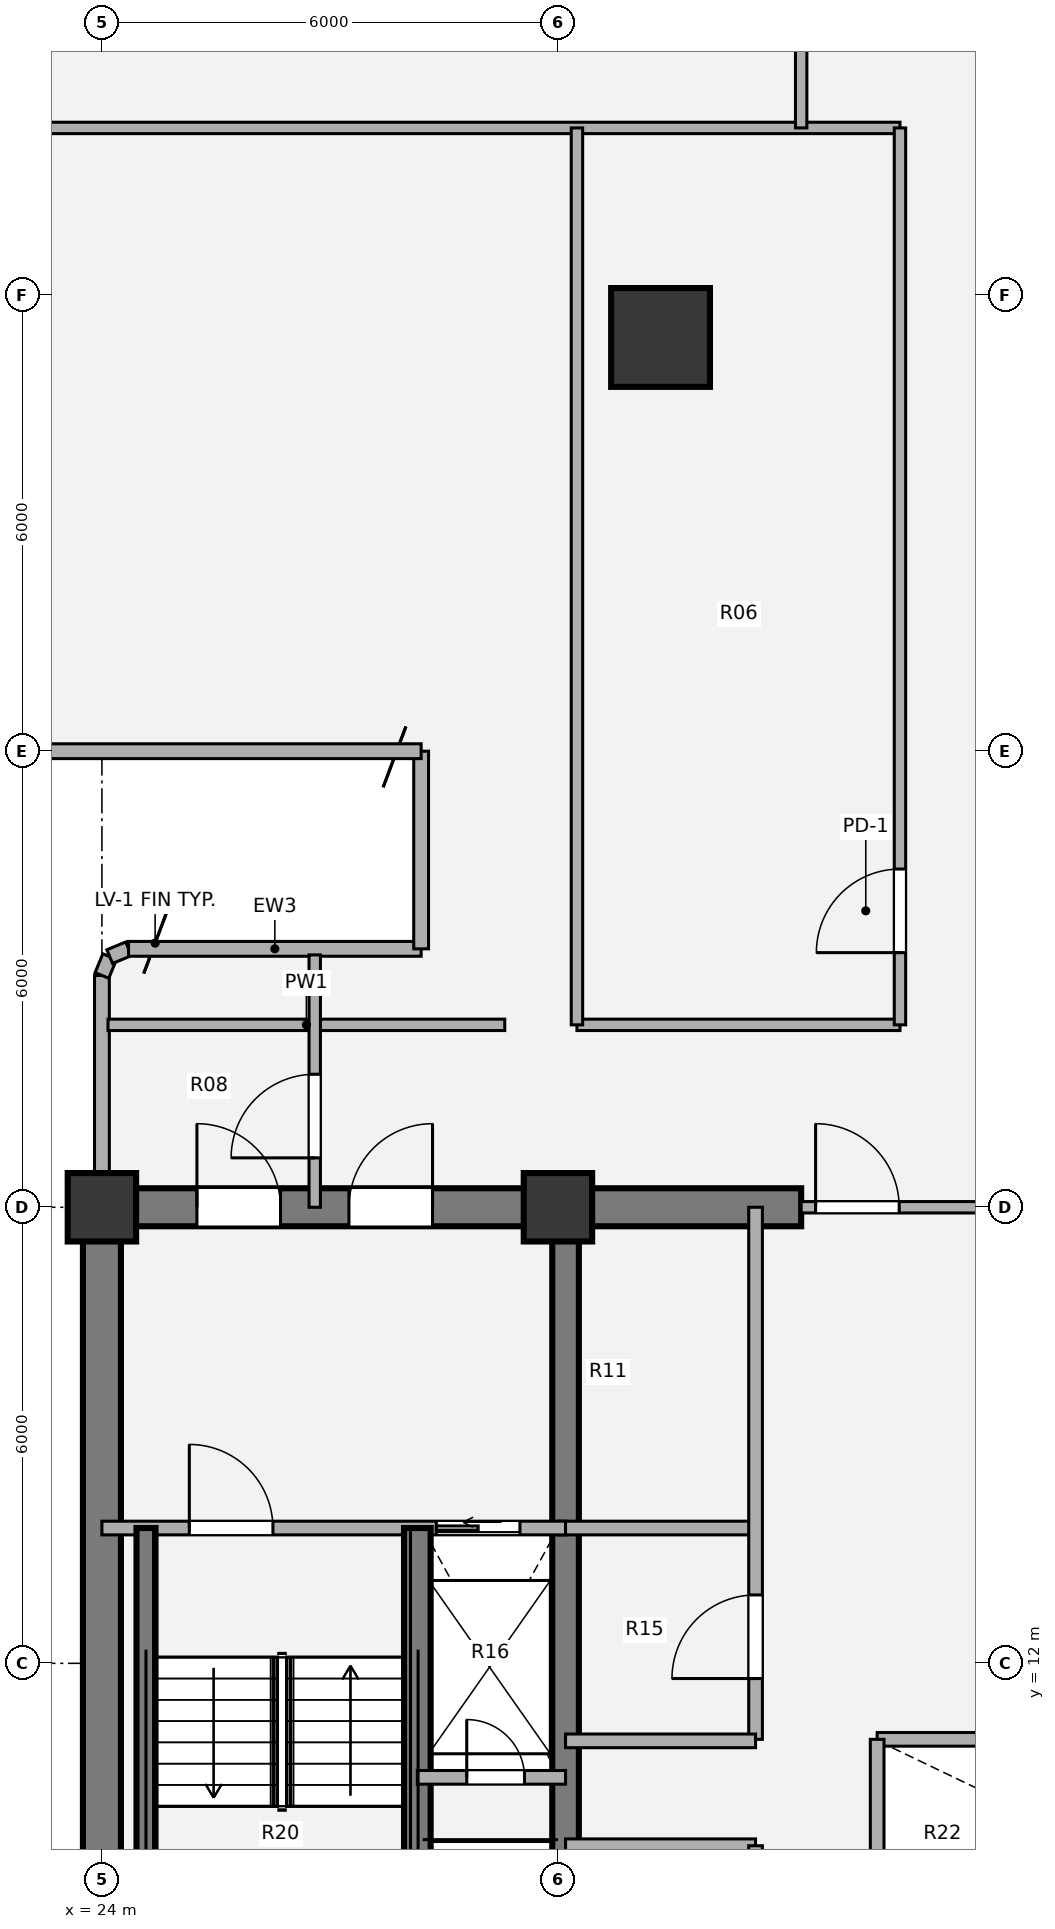
"""IFC4 building model, lengths in metres.
Left out: names, types, materials, properties, quantities, classifications, styles, units other than length and angle.
Written with IfcOpenShell. Run it as: python <this file> out.ifc"""

import sys

from ifc_helpers import new_model, si_unit, direction, frame, frame_2d, origin, origin_2d, place, context, subcontext, project, spatial, rectangle, hollow_circle, extrude, source, transform, mapped, element, fill, save


model = new_model("IFC4")
c1 = context("Model", 3, precision=1e-05, world=origin(), true_north=direction((0.0, 1.0)))
c2 = subcontext(c1, "Body", "Model", "MODEL_VIEW")
j1 = project(units=[si_unit("LENGTHUNIT", "METRE"), si_unit("PLANEANGLEUNIT", "RADIAN")], contexts=[c1])
p1 = place(None, origin())
s1 = spatial("IfcSite", under=j1, at=p1, CompositionType="ELEMENT")
p2 = place(p1, origin())
s2 = spatial("IfcBuilding", under=s1, at=p2, CompositionType="ELEMENT")
p3 = place(p2, frame((0.0, 0.0, 146.52)))
s3 = spatial("IfcBuildingStorey", under=s2, at=p3, CompositionType="ELEMENT", Elevation=146.52)
m1 = source(origin(), c2, "Body", "SweptSolid", [
    extrude(rectangle(XDim=0.9, YDim=0.9, at=origin_2d()), origin(), (0.0, 0.0, 1.0), 5.4),
])
for number, where, z_axis, x_axis in (
    (1, (24.0, 18.0, 0.0), (0.0, 0.0, 1.0), (1.0, 0.0, 0.0)),
    (2, (30.0, 18.0, 0.0), (0.0, 0.0, 1.0), (1.0, 0.0, 0.0)),
):
    element("IfcColumn", number, at=place(p3, frame(where, z_axis=z_axis, x_axis=x_axis)), inside=s3, PredefinedType="COLUMN", context=c2, shape_type="MappedRepresentation", body=[
        mapped(m1, transform((0.0, 0.0, 0.0), x_axis=(1.0, 0.0, 0.0), y_axis=(0.0, 1.0, 0.0), z_axis=(0.0, 0.0, 1.0), scale=1.0)),
    ])
p4 = place(p3, frame((24.0, 6.0, 0.0), z_axis=(0.0, 0.0, 1.0), x_axis=(0.0, 1.0, 0.0)))
e3 = element("IfcWall", 3, at=p4, inside=s3, PredefinedType="SHEAR", context=c2, shape_type="SweptSolid", body=[
    extrude(rectangle(XDim=12.0, YDim=0.5, at=frame_2d((6.0, 0.0))), origin(), (0.0, 0.0, 1.0), 5.4),
])
p5 = place(p3, frame((23.75, 18.0, 0.0), z_axis=(0.0, 0.0, 1.0), x_axis=(1.0, 0.0, 0.0)))
e4 = element("IfcWall", 4, at=p5, inside=s3, PredefinedType="SHEAR", context=c2, shape_type="SweptSolid", body=[
    extrude(rectangle(XDim=9.45, YDim=0.5, at=frame_2d((4.725, 0.0))), origin(), (0.0, 0.0, 1.0), 5.4),
])
p6 = place(p5, frame((1.5, 0.0, 0.0)))
e5 = element("IfcOpeningElement", 5, at=p6, cuts=e4, PredefinedType="OPENING", context=c2, shape_type="SweptSolid", body=[
    extrude(rectangle(XDim=1.1, YDim=2.1, at=origin_2d()), frame((0.55, 0.26, 1.05), z_axis=(0.0, -1.0, 0.0), x_axis=(1.0, 0.0, 0.0)), (0.0, 0.0, 1.0), 0.52),
])
p7 = place(p5, frame((3.5, 0.0, 0.0)))
e6 = element("IfcOpeningElement", 6, at=p7, cuts=e4, PredefinedType="OPENING", context=c2, shape_type="SweptSolid", body=[
    extrude(rectangle(XDim=1.1, YDim=2.1, at=origin_2d()), frame((0.55, 0.26, 1.05), z_axis=(0.0, -1.0, 0.0), x_axis=(1.0, 0.0, 0.0)), (0.0, 0.0, 1.0), 0.52),
])
p8 = place(p3, frame((30.1, 6.0, 0.0), z_axis=(0.0, 0.0, 1.0), x_axis=(0.0, 1.0, 0.0)))
e7 = element("IfcWall", 7, at=p8, inside=s3, PredefinedType="SHEAR", context=c2, shape_type="SweptSolid", body=[
    extrude(rectangle(XDim=12.0, YDim=0.35, at=frame_2d((6.0, 0.0))), origin(), (0.0, 0.0, 1.0), 5.4),
])
m2 = source(origin(), c2, "Body", "SweptSolid", [
    extrude(hollow_circle(Radius=0.65, WallThickness=0.045, at=origin_2d()), origin(), (0.0, 0.0, 1.0), 6.338),
])
p9 = place(p3, frame((31.35, 27.482, 0.421), z_axis=(0.0, 0.618885910055, 0.785480891133), x_axis=(-1.0, 0.0, 0.0)))
e8 = element("IfcColumn", 8, at=p9, inside=s3, PredefinedType="COLUMN", context=c2, shape_type="MappedRepresentation", body=[
    mapped(m2, transform((0.0, 0.0, 0.0), x_axis=(1.0, 0.0, 0.0), y_axis=(0.0, 1.0, 0.0), z_axis=(0.0, 0.0, 1.0), scale=1.0)),
])
p10 = place(p3, frame((24.0, 18.43, 0.0), z_axis=(0.0, 0.0, 1.0), x_axis=(0.0, 1.0, 0.0)))
e9 = element("IfcWall", 9, at=p10, inside=s3, PredefinedType="SOLIDWALL", context=c2, shape_type="SweptSolid", body=[
    extrude(rectangle(XDim=2.62, YDim=0.195, at=frame_2d((1.31, 0.0))), origin(), (0.0, 0.0, 1.0), 5.08),
])
p11 = place(p3, frame((24.0, 21.05, 0.0), z_axis=(0.0, 0.0, 1.0), x_axis=(0.382673670509, 0.923883575944, 0.0)))
e10 = element("IfcWall", 10, at=p11, inside=s3, PredefinedType="SOLIDWALL", context=c2, shape_type="SweptSolid", body=[
    extrude(rectangle(XDim=0.268, YDim=0.195, at=frame_2d((0.134, 0.0))), origin(), (0.0, 0.0, 1.0), 5.08),
])
p12 = place(p3, frame((24.103, 21.298, 0.0), z_axis=(0.0, 0.0, 1.0), x_axis=(0.924205486139, 0.381895560841, 0.0)))
e11 = element("IfcWall", 11, at=p12, inside=s3, PredefinedType="SOLIDWALL", context=c2, shape_type="SweptSolid", body=[
    extrude(rectangle(XDim=0.268, YDim=0.195, at=frame_2d((0.134, 0.0))), origin(), (0.0, 0.0, 1.0), 5.08),
])
p13 = place(p3, frame((24.35, 21.4, 0.0), z_axis=(0.0, 0.0, 1.0), x_axis=(1.0, 0.0, 0.0)))
e12 = element("IfcWall", 12, at=p13, inside=s3, PredefinedType="SOLIDWALL", context=c2, shape_type="SweptSolid", body=[
    extrude(rectangle(XDim=3.85, YDim=0.195, at=frame_2d((1.925, 0.0))), origin(), (0.0, 0.0, 1.0), 5.08),
])
p14 = place(p3, frame((28.2, 21.4, 0.0), z_axis=(0.0, 0.0, 1.0), x_axis=(0.0, 1.0, 0.0)))
e13 = element("IfcWall", 13, at=p14, inside=s3, PredefinedType="SOLIDWALL", context=c2, shape_type="SweptSolid", body=[
    extrude(rectangle(XDim=2.6, YDim=0.195, at=frame_2d((1.3, 0.0))), origin(), (0.0, 0.0, 1.0), 5.08),
])
p15 = place(p3, frame((28.2, 24.0, 0.0), z_axis=(0.0, 0.0, 1.0), x_axis=(-1.0, 0.0, 0.0)))
e14 = element("IfcWall", 14, at=p15, inside=s3, PredefinedType="SOLIDWALL", context=c2, shape_type="SweptSolid", body=[
    extrude(rectangle(XDim=11.1, YDim=0.195, at=frame_2d((5.55, 0.0))), origin(), (0.0, 0.0, 1.0), 5.08),
])
p16 = place(p3, frame((30.0, 13.78, 0.0), z_axis=(0.0, 0.0, 1.0), x_axis=(1.0, 0.0, 0.0)))
e15 = element("IfcWall", 15, at=p16, inside=s3, PredefinedType="PARTITIONING", context=c2, shape_type="SweptSolid", body=[
    extrude(rectangle(XDim=2.6, YDim=0.18, at=frame_2d((1.3, 0.0))), origin(), (0.0, 0.0, 1.0), 5.05),
])
p17 = place(p3, frame((32.6, 11.0, 0.0), z_axis=(0.0, 0.0, 1.0), x_axis=(0.0, 1.0, 0.0)))
e16 = element("IfcWall", 16, at=p17, inside=s3, PredefinedType="PARTITIONING", context=c2, shape_type="SweptSolid", body=[
    extrude(rectangle(XDim=7.0, YDim=0.18, at=frame_2d((3.5, 0.0))), origin(), (0.0, 0.0, 1.0), 5.05),
])
p18 = place(p17, frame((0.8, 0.0, 0.0)))
e17 = element("IfcOpeningElement", 17, at=p18, cuts=e16, PredefinedType="OPENING", context=c2, shape_type="SweptSolid", body=[
    extrude(rectangle(XDim=1.1, YDim=2.1, at=origin_2d()), frame((0.55, 0.1, 1.05), z_axis=(0.0, -1.0, 0.0), x_axis=(1.0, 0.0, 0.0)), (0.0, 0.0, 1.0), 0.2),
])
p19 = place(p3, frame((34.2, 11.0, 0.0), z_axis=(0.0, 0.0, 1.0), x_axis=(1.0, 0.0, 0.0)))
e18 = element("IfcWall", 18, at=p19, inside=s3, PredefinedType="PARTITIONING", context=c2, shape_type="SweptSolid", body=[
    extrude(rectangle(XDim=5.15, YDim=0.18, at=frame_2d((2.575, 0.0))), origin(), (0.0, 0.0, 1.0), 5.05),
])
for number, where, z_axis, x_axis in (
    (19, (34.2, 8.5, 0.0), (0.0, 0.0, 1.0), (0.0, 1.0, 0.0)),
    (20, (30.1, 10.98, 0.0), (0.0, 0.0, 1.0), (1.0, 0.0, 0.0)),
    (21, (30.1, 9.6, 0.0), (0.0, 0.0, 1.0), (1.0, 0.0, 0.0)),
):
    element("IfcWall", number, at=place(p3, frame(where, z_axis=z_axis, x_axis=x_axis)), inside=s3, PredefinedType="PARTITIONING", context=c2, shape_type="SweptSolid", body=[
        extrude(rectangle(XDim=2.5, YDim=0.18, at=frame_2d((1.25, 0.0))), origin(), (0.0, 0.0, 1.0), 5.05),
    ])
p20 = place(p3, frame((32.6, 6.0, 0.0), z_axis=(0.0, 0.0, 1.0), x_axis=(0.0, 1.0, 0.0)))
e22 = element("IfcWall", 22, at=p20, inside=s3, PredefinedType="PARTITIONING", context=c2, shape_type="SweptSolid", body=[
    extrude(rectangle(XDim=3.6, YDim=0.18, at=frame_2d((1.8, 0.0))), origin(), (0.0, 0.0, 1.0), 5.05),
])
p21 = place(p20, frame((1.35, 0.0, 0.0)))
e23 = element("IfcOpeningElement", 23, at=p21, cuts=e22, PredefinedType="OPENING", context=c2, shape_type="SweptSolid", body=[
    extrude(rectangle(XDim=0.86, YDim=2.1, at=origin_2d()), frame((0.43, 0.1, 1.05), z_axis=(0.0, -1.0, 0.0), x_axis=(1.0, 0.0, 0.0)), (0.0, 0.0, 1.0), 0.2),
])
p22 = place(p3, frame((33.2, 18.0, 0.0), z_axis=(0.0, 0.0, 1.0), x_axis=(1.0, 0.0, 0.0)))
e24 = element("IfcWall", 24, at=p22, inside=s3, PredefinedType="PARTITIONING", context=c2, shape_type="SweptSolid", body=[
    extrude(rectangle(XDim=5.6, YDim=0.15, at=frame_2d((2.8, 0.0))), origin(), (0.0, 0.0, 1.0), 3.865),
])
p23 = place(p22, frame((0.19, 0.0, 0.0)))
e25 = element("IfcOpeningElement", 25, at=p23, cuts=e24, PredefinedType="OPENING", context=c2, shape_type="SweptSolid", body=[
    extrude(rectangle(XDim=1.1, YDim=2.1, at=origin_2d()), frame((0.55, 0.085, 1.05), z_axis=(0.0, -1.0, 0.0), x_axis=(1.0, 0.0, 0.0)), (0.0, 0.0, 1.0), 0.17),
])
p24 = place(p22, frame((4.31, 0.0, 0.0)))
e26 = element("IfcOpeningElement", 26, at=p24, cuts=e24, PredefinedType="OPENING", context=c2, shape_type="SweptSolid", body=[
    extrude(rectangle(XDim=1.1, YDim=2.1, at=origin_2d()), frame((0.55, 0.085, 1.05), z_axis=(0.0, -1.0, 0.0), x_axis=(1.0, 0.0, 0.0)), (0.0, 0.0, 1.0), 0.17),
])
p25 = place(p3, frame((24.0, 13.78, 0.0), z_axis=(0.0, 0.0, 1.0), x_axis=(1.0, 0.0, 0.0)))
e27 = element("IfcWall", 27, at=p25, inside=s3, PredefinedType="PARTITIONING", context=c2, shape_type="SweptSolid", body=[
    extrude(rectangle(XDim=6.1, YDim=0.18, at=frame_2d((3.05, 0.0))), origin(), (0.0, 0.0, 1.0), 2.229),
])
p26 = place(p25, frame((1.15, 0.0, 0.0)))
e28 = element("IfcOpeningElement", 28, at=p26, cuts=e27, PredefinedType="OPENING", context=c2, shape_type="SweptSolid", body=[
    extrude(rectangle(XDim=1.1, YDim=2.1, at=origin_2d()), frame((0.55, 0.1, 1.05), z_axis=(0.0, -1.0, 0.0), x_axis=(1.0, 0.0, 0.0)), (0.0, 0.0, 1.0), 0.2),
])
p27 = place(p25, frame((4.4, 0.0, 0.0)))
e29 = element("IfcOpeningElement", 29, at=p27, cuts=e27, PredefinedType="OPENING", context=c2, shape_type="SweptSolid", body=[
    extrude(rectangle(XDim=1.1, YDim=2.1, at=origin_2d()), frame((0.55, 0.1, 1.05), z_axis=(0.0, -1.0, 0.0), x_axis=(1.0, 0.0, 0.0)), (0.0, 0.0, 1.0), 0.2),
])
p28 = place(p3, frame((28.15, 6.0, 0.0), z_axis=(0.0, 0.0, 1.0), x_axis=(0.0, 1.0, 0.0)))
e30 = element("IfcWall", 30, at=p28, inside=s3, PredefinedType="SHEAR", context=c2, shape_type="SweptSolid", body=[
    extrude(rectangle(XDim=7.78, YDim=0.35, at=frame_2d((3.89, 0.0))), origin(), (0.0, 0.0, 1.0), 5.4),
])
p29 = place(p3, frame((24.58, 6.0, 0.0), z_axis=(0.0, 0.0, 1.0), x_axis=(0.0, 1.0, 0.0)))
e31 = element("IfcWall", 31, at=p29, inside=s3, PredefinedType="SHEAR", context=c2, shape_type="SweptSolid", body=[
    extrude(rectangle(XDim=7.78, YDim=0.25, at=frame_2d((3.89, 0.0))), origin(), (0.0, 0.0, 1.0), 5.4),
])
p30 = place(p3, frame((28.15, 10.5, 0.0), z_axis=(0.0, 0.0, 1.0), x_axis=(1.0, 0.0, 0.0)))
e32 = element("IfcWall", 32, at=p30, inside=s3, PredefinedType="PARTITIONING", context=c2, shape_type="SweptSolid", body=[
    extrude(rectangle(XDim=1.95, YDim=0.18, at=frame_2d((0.975, 0.0))), origin(), (0.0, 0.0, 1.0), 5.05),
])
p31 = place(p30, frame((0.65, 0.0, 0.0)))
e33 = element("IfcOpeningElement", 33, at=p31, cuts=e32, PredefinedType="OPENING", context=c2, shape_type="SweptSolid", body=[
    extrude(rectangle(XDim=0.76, YDim=2.05, at=origin_2d()), frame((0.38, 0.1, 1.025), z_axis=(0.0, -1.0, 0.0), x_axis=(1.0, 0.0, 0.0)), (0.0, 0.0, 1.0), 0.2),
])
p32 = place(p3, frame((24.08, 20.4, 0.0), z_axis=(0.0, 0.0, 1.0), x_axis=(1.0, 0.0, 0.0)))
e34 = element("IfcWall", 34, at=p32, inside=s3, PredefinedType="PARTITIONING", context=c2, shape_type="SweptSolid", body=[
    extrude(rectangle(XDim=5.22, YDim=0.15, at=frame_2d((2.61, 0.0))), origin(), (0.0, 0.0, 1.0), 5.05),
])
p33 = place(p3, frame((30.25, 20.4, 0.0), z_axis=(0.0, 0.0, 1.0), x_axis=(1.0, 0.0, 0.0)))
e35 = element("IfcWall", 35, at=p33, inside=s3, PredefinedType="PARTITIONING", context=c2, shape_type="SweptSolid", body=[
    extrude(rectangle(XDim=4.25, YDim=0.15, at=frame_2d((2.125, 0.0))), origin(), (0.0, 0.0, 1.0), 5.05),
])
p34 = place(p3, frame((16.5, 32.2, 0.0), z_axis=(0.0, 0.0, 1.0), x_axis=(1.0, 0.0, 0.0)))
e36 = element("IfcWall", 36, at=p34, inside=s3, PredefinedType="PARTITIONING", context=c2, shape_type="SweptSolid", body=[
    extrude(rectangle(XDim=18.0, YDim=0.15, at=frame_2d((9.0, 0.0))), origin(), (0.0, 0.0, 1.0), 5.05),
])
p35 = place(p3, frame((26.8, 18.0, 0.0), z_axis=(0.0, 0.0, 1.0), x_axis=(0.0, 1.0, 0.0)))
e37 = element("IfcWall", 37, at=p35, inside=s3, PredefinedType="PARTITIONING", context=c2, shape_type="SweptSolid", body=[
    extrude(rectangle(XDim=3.32, YDim=0.15, at=frame_2d((1.66, 0.0))), origin(), (0.0, 0.0, 1.0), 5.05),
])
p36 = place(p35, frame((0.65, 0.0, 0.0)))
e38 = element("IfcOpeningElement", 38, at=p36, cuts=e37, PredefinedType="OPENING", context=c2, shape_type="SweptSolid", body=[
    extrude(rectangle(XDim=1.1, YDim=2.1, at=origin_2d()), frame((0.55, 0.085, 1.05), z_axis=(0.0, -1.0, 0.0), x_axis=(1.0, 0.0, 0.0)), (0.0, 0.0, 1.0), 0.17),
])
p37 = place(p3, frame((30.25, 20.4, 0.0), z_axis=(0.0, 0.0, 1.0), x_axis=(0.0, 1.0, 0.0)))
e39 = element("IfcWall", 39, at=p37, inside=s3, PredefinedType="PARTITIONING", context=c2, shape_type="SweptSolid", body=[
    extrude(rectangle(XDim=11.8, YDim=0.15, at=frame_2d((5.9, 0.0))), origin(), (0.0, 0.0, 1.0), 3.265),
])
p38 = place(p3, frame((33.2, 32.2, 0.0), z_axis=(0.0, 0.0, 1.0), x_axis=(0.0, 1.0, 0.0)))
e40 = element("IfcWall", 40, at=p38, inside=s3, PredefinedType="PARTITIONING", context=c2, shape_type="SweptSolid", body=[
    extrude(rectangle(XDim=3.2, YDim=0.15, at=frame_2d((1.6, 0.0))), origin(), (0.0, 0.0, 1.0), 5.05),
])
p39 = place(p38, frame((1.05, 0.0, 0.0)))
e41 = element("IfcOpeningElement", 41, at=p39, cuts=e40, PredefinedType="OPENING", context=c2, shape_type="SweptSolid", body=[
    extrude(rectangle(XDim=1.1, YDim=2.1, at=origin_2d()), frame((0.55, 0.085, 1.05), z_axis=(0.0, -1.0, 0.0), x_axis=(1.0, 0.0, 0.0)), (0.0, 0.0, 1.0), 0.17),
])
p40 = place(p3, frame((34.5, 20.4, 0.0), z_axis=(0.0, 0.0, 1.0), x_axis=(0.0, 1.0, 0.0)))
e42 = element("IfcWall", 42, at=p40, inside=s3, PredefinedType="PARTITIONING", context=c2, shape_type="SweptSolid", body=[
    extrude(rectangle(XDim=11.8, YDim=0.15, at=frame_2d((5.9, 0.0))), origin(), (0.0, 0.0, 1.0), 5.05),
])
p41 = place(p40, frame((0.95, 0.0, 0.0)))
e43 = element("IfcOpeningElement", 43, at=p41, cuts=e42, PredefinedType="OPENING", context=c2, shape_type="SweptSolid", body=[
    extrude(rectangle(XDim=1.1, YDim=2.1, at=origin_2d()), frame((0.55, 0.085, 1.05), z_axis=(0.0, -1.0, 0.0), x_axis=(1.0, 0.0, 0.0)), (0.0, 0.0, 1.0), 0.17),
])
m3 = source(origin(), c2, "Body", "SweptSolid", [
    extrude(rectangle(XDim=1.1, YDim=2.1, at=origin_2d()), frame((0.55, 0.025, 1.05), z_axis=(0.0, -1.0, 0.0), x_axis=(1.0, 0.0, 0.0)), (0.0, 0.0, 1.0), 0.05),
])
p42 = place(p18, origin())
e44 = element("IfcDoor", 44, at=p42, inside=s3, OperationType="SINGLE_SWING_LEFT", PredefinedType="DOOR", context=c2, shape_type="MappedRepresentation", body=[
    mapped(m3, transform((0.0, 0.0, 0.0), x_axis=(1.0, 0.0, 0.0), y_axis=(0.0, 1.0, 0.0), z_axis=(0.0, 0.0, 1.0), scale=1.0)),
])
fill(e17, e44)
m4 = source(origin(), c2, "Body", "SweptSolid", [
    extrude(rectangle(XDim=1.1, YDim=2.1, at=origin_2d()), frame((0.55, 0.025, 1.05), z_axis=(0.0, -1.0, 0.0), x_axis=(1.0, 0.0, 0.0)), (0.0, 0.0, 1.0), 0.05),
])
p43 = place(p23, origin())
e45 = element("IfcDoor", 45, at=p43, inside=s3, OperationType="SINGLE_SWING_LEFT", PredefinedType="DOOR", context=c2, shape_type="MappedRepresentation", body=[
    mapped(m4, transform((0.0, 0.0, 0.0), x_axis=(1.0, 0.0, 0.0), y_axis=(0.0, 1.0, 0.0), z_axis=(0.0, 0.0, 1.0), scale=1.0)),
])
fill(e25, e45)
m5 = source(origin(), c2, "Body", "SweptSolid", [
    extrude(rectangle(XDim=1.1, YDim=2.1, at=origin_2d()), frame((0.55, 0.025, 1.05), z_axis=(0.0, -1.0, 0.0), x_axis=(1.0, 0.0, 0.0)), (0.0, 0.0, 1.0), 0.05),
])
p44 = place(p26, origin())
e46 = element("IfcDoor", 46, at=p44, inside=s3, OperationType="SINGLE_SWING_LEFT", PredefinedType="DOOR", context=c2, shape_type="MappedRepresentation", body=[
    mapped(m5, transform((0.0, 0.0, 0.0), x_axis=(1.0, 0.0, 0.0), y_axis=(0.0, 1.0, 0.0), z_axis=(0.0, 0.0, 1.0), scale=1.0)),
])
fill(e28, e46)
m6 = source(origin(), c2, "Body", "SweptSolid", [
    extrude(rectangle(XDim=1.1, YDim=2.1, at=origin_2d()), frame((0.55, 0.025, 1.05), z_axis=(0.0, -1.0, 0.0), x_axis=(1.0, 0.0, 0.0)), (0.0, 0.0, 1.0), 0.05),
])
p45 = place(p27, origin())
e47 = element("IfcDoor", 47, at=p45, inside=s3, OperationType="SLIDING_TO_LEFT", PredefinedType="DOOR", context=c2, shape_type="MappedRepresentation", body=[
    mapped(m6, transform((0.0, 0.0, 0.0), x_axis=(1.0, 0.0, 0.0), y_axis=(0.0, 1.0, 0.0), z_axis=(0.0, 0.0, 1.0), scale=1.0)),
])
fill(e29, e47)
m7 = source(origin(), c2, "Body", "SweptSolid", [
    extrude(rectangle(XDim=0.76, YDim=2.05, at=origin_2d()), frame((0.38, 0.025, 1.025), z_axis=(0.0, -1.0, 0.0), x_axis=(1.0, 0.0, 0.0)), (0.0, 0.0, 1.0), 0.05),
])
p46 = place(p31, origin())
e48 = element("IfcDoor", 48, at=p46, inside=s3, OperationType="SINGLE_SWING_LEFT", PredefinedType="DOOR", context=c2, shape_type="MappedRepresentation", body=[
    mapped(m7, transform((0.0, 0.0, 0.0), x_axis=(1.0, 0.0, 0.0), y_axis=(0.0, 1.0, 0.0), z_axis=(0.0, 0.0, 1.0), scale=1.0)),
])
fill(e33, e48)
p47 = place(p6, origin())
e49 = element("IfcDoor", 49, at=p47, inside=s3, OperationType="SINGLE_SWING_LEFT", PredefinedType="DOOR", context=c2, shape_type="MappedRepresentation", body=[
    mapped(m4, transform((0.0, 0.0, 0.0), x_axis=(1.0, 0.0, 0.0), y_axis=(0.0, 1.0, 0.0), z_axis=(0.0, 0.0, 1.0), scale=1.0)),
])
fill(e5, e49)
p48 = place(p7, origin())
e50 = element("IfcDoor", 50, at=p48, inside=s3, OperationType="SINGLE_SWING_RIGHT", PredefinedType="DOOR", context=c2, shape_type="MappedRepresentation", body=[
    mapped(m4, transform((0.0, 0.0, 0.0), x_axis=(1.0, 0.0, 0.0), y_axis=(0.0, 1.0, 0.0), z_axis=(0.0, 0.0, 1.0), scale=1.0)),
])
fill(e6, e50)
p49 = place(p36, origin())
e51 = element("IfcDoor", 51, at=p49, inside=s3, OperationType="SINGLE_SWING_LEFT", PredefinedType="DOOR", context=c2, shape_type="MappedRepresentation", body=[
    mapped(m3, transform((0.0, 0.0, 0.0), x_axis=(1.0, 0.0, 0.0), y_axis=(0.0, 1.0, 0.0), z_axis=(0.0, 0.0, 1.0), scale=1.0)),
])
fill(e38, e51)
p50 = place(p41, origin())
e52 = element("IfcDoor", 52, at=p50, inside=s3, OperationType="SINGLE_SWING_LEFT", PredefinedType="DOOR", context=c2, shape_type="MappedRepresentation", body=[
    mapped(m3, transform((0.0, 0.0, 0.0), x_axis=(1.0, 0.0, 0.0), y_axis=(0.0, 1.0, 0.0), z_axis=(0.0, 0.0, 1.0), scale=1.0)),
])
fill(e43, e52)
save(model, sys.argv[1])
